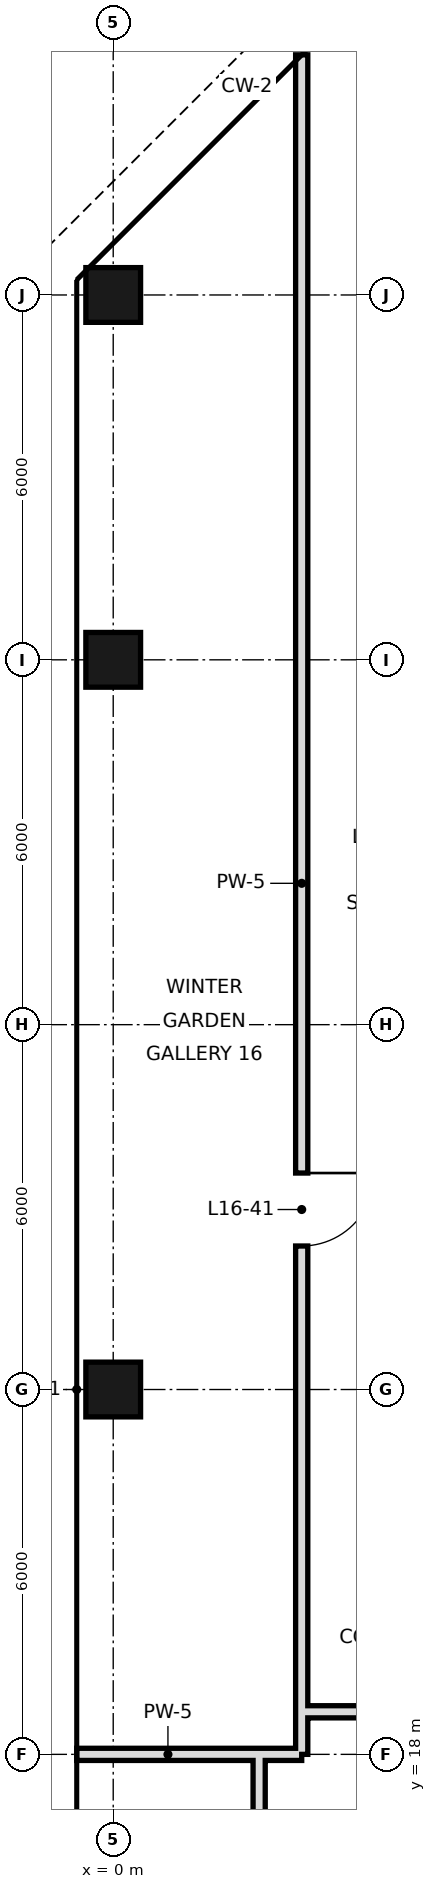
"""IFC4 building model, lengths in metres.
Left out: names, types, materials, properties, quantities, classifications, styles, units other than length and angle.
Written with IfcOpenShell. Run it as: python <this file> out.ifc"""

import sys

from ifc_helpers import new_model, si_unit, direction, frame, frame_2d, origin, origin_2d, place, context, subcontext, project, spatial, rectangle, hollow_rectangle, extrude, element, fill, save


model = new_model("IFC4")
c1 = context("Model", 3, precision=1e-05, world=origin(), true_north=direction((0.0, 1.0)))
c2 = subcontext(c1, "Body", "Model", "MODEL_VIEW")
j1 = project(units=[si_unit("LENGTHUNIT", "METRE"), si_unit("PLANEANGLEUNIT", "RADIAN")], contexts=[c1])
p1 = place(None, origin())
s1 = spatial("IfcSite", under=j1, at=p1, CompositionType="ELEMENT")
p2 = place(p1, origin())
s2 = spatial("IfcBuilding", under=s1, at=p2, CompositionType="ELEMENT")
p3 = place(p2, frame((0.0, 0.0, 78.6)))
s3 = spatial("IfcBuildingStorey", under=s2, at=p3, CompositionType="ELEMENT", Elevation=78.6)
for number, where, z_axis, x_axis in (
    (1, (0.0, 24.0, 0.0), (0.0, 0.0, 1.0), (1.0, 0.0, 0.0)),
    (2, (0.0, 36.0, 0.0), (0.0, 0.0, 1.0), (1.0, 0.0, 0.0)),
    (3, (0.0, 42.0, 0.0), (0.0, 0.0, 1.0), (1.0, 0.0, 0.0)),
):
    element("IfcColumn", number, at=place(p3, frame(where, z_axis=z_axis, x_axis=x_axis)), inside=s3, PredefinedType="COLUMN", context=c2, shape_type="SweptSolid", body=[
        extrude(hollow_rectangle(XDim=0.9, YDim=0.9, WallThickness=0.045, at=origin_2d()), origin(), (0.0, 0.0, 1.0), 3.6),
    ])
p4 = place(p3, frame((2.4, 10.8, 0.0), z_axis=(0.0, 0.0, 1.0), x_axis=(0.0, 1.0, 0.0)))
e4 = element("IfcWall", 4, at=p4, inside=s3, PredefinedType="SOLIDWALL", context=c2, shape_type="SweptSolid", body=[
    extrude(rectangle(XDim=7.2, YDim=0.2, at=frame_2d((3.6, 0.0))), origin(), (0.0, 0.0, 1.0), 2.72),
])
p5 = place(p3, frame((3.1, 18.7, 0.0), z_axis=(0.0, 0.0, 1.0), x_axis=(0.0, 1.0, 0.0)))
e5 = element("IfcWall", 5, at=p5, inside=s3, PredefinedType="SOLIDWALL", context=c2, shape_type="SweptSolid", body=[
    extrude(rectangle(XDim=27.249, YDim=0.2, at=frame_2d((13.625, 0.0))), origin(), (0.0, 0.0, 1.0), 2.97),
])
p6 = place(p5, frame((7.66, 0.0, 0.0)))
e6 = element("IfcOpeningElement", 6, at=p6, cuts=e5, PredefinedType="OPENING", context=c2, shape_type="SweptSolid", body=[
    extrude(rectangle(XDim=1.2, YDim=2.4, at=frame_2d((0.6, 1.2))), frame((0.0, 0.11, 0.0), z_axis=(0.0, -1.0, 0.0), x_axis=(1.0, 0.0, 0.0)), (0.0, 0.0, 1.0), 0.22),
])
p7 = place(p3, frame((3.1, 18.0, 0.0), z_axis=(0.0, 0.0, 1.0), x_axis=(0.0, 1.0, 0.0)))
e7 = element("IfcWall", 7, at=p7, inside=s3, PredefinedType="SOLIDWALL", context=c2, shape_type="SweptSolid", body=[
    extrude(rectangle(XDim=0.7, YDim=0.2, at=frame_2d((0.35, 0.0))), origin(), (0.0, 0.0, 1.0), 2.97),
])
p8 = place(p3, frame((-0.6, 18.0, 0.0), z_axis=(0.0, 0.0, 1.0), x_axis=(1.0, 0.0, 0.0)))
e8 = element("IfcWall", 8, at=p8, inside=s3, PredefinedType="SOLIDWALL", context=c2, shape_type="SweptSolid", body=[
    extrude(rectangle(XDim=3.0, YDim=0.2, at=frame_2d((1.5, 0.0))), origin(), (0.0, 0.0, 1.0), 2.72),
])
p9 = place(p3, frame((2.4, 18.0, 0.0), z_axis=(0.0, 0.0, 1.0), x_axis=(1.0, 0.0, 0.0)))
e9 = element("IfcWall", 9, at=p9, inside=s3, PredefinedType="SOLIDWALL", context=c2, shape_type="SweptSolid", body=[
    extrude(rectangle(XDim=0.7, YDim=0.2, at=frame_2d((0.35, 0.0))), origin(), (0.0, 0.0, 1.0), 2.97),
])
p10 = place(p3, frame((3.1, 18.7, 0.0), z_axis=(0.0, 0.0, 1.0), x_axis=(1.0, 0.0, 0.0)))
e10 = element("IfcWall", 10, at=p10, inside=s3, PredefinedType="SOLIDWALL", context=c2, shape_type="SweptSolid", body=[
    extrude(rectangle(XDim=3.5, YDim=0.2, at=frame_2d((1.75, 0.0))), origin(), (0.0, 0.0, 1.0), 2.72),
])
p11 = place(p6, origin())
e11 = element("IfcDoor", 11, at=p11, inside=s3, OperationType="SINGLE_SWING_RIGHT", PredefinedType="DOOR", context=c2, shape_type="SweptSolid", body=[
    extrude(rectangle(XDim=1.2, YDim=2.4, at=frame_2d((0.6, 1.2))), frame((0.0, 0.025, 0.0), z_axis=(0.0, -1.0, 0.0), x_axis=(1.0, 0.0, 0.0)), (0.0, 0.0, 1.0), 0.05),
])
fill(e6, e11)
save(model, sys.argv[1])
